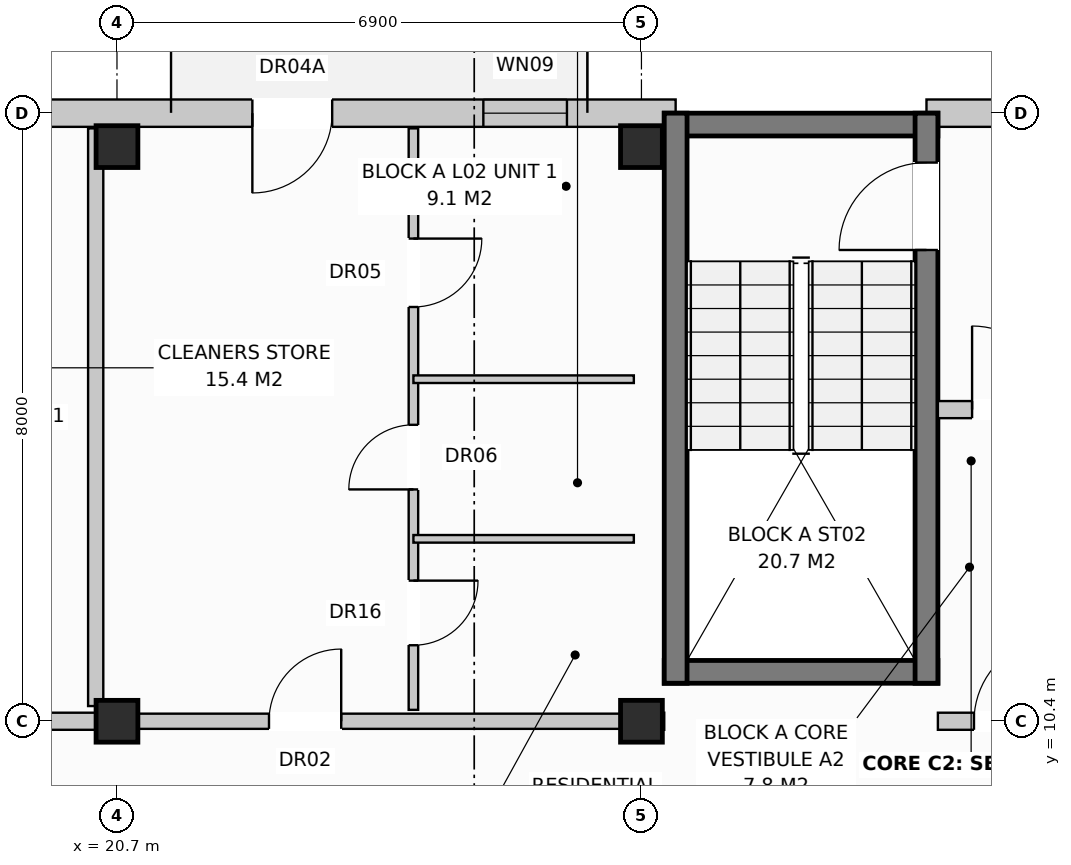
"""IFC4 building model, lengths in metres.
Left out: names, types, materials, properties, quantities, classifications, styles, units other than length and angle.
Written with IfcOpenShell. Run it as: python <this file> out.ifc"""

import sys

from ifc_helpers import new_model, si_unit, direction, frame, frame_2d, origin, origin_with_axes, origin_2d, place, context, subcontext, project, spatial, rectangle, extrude, element, fill, save


model = new_model("IFC4")
c1 = context("Model", 3, precision=1e-05, world=origin(), true_north=direction((0.0, 1.0)))
c2 = subcontext(c1, "Body", "Model", "MODEL_VIEW")
j1 = project(units=[si_unit("LENGTHUNIT", "METRE"), si_unit("PLANEANGLEUNIT", "RADIAN")], contexts=[c1])
p1 = place(None, origin())
s1 = spatial("IfcSite", under=j1, at=p1, CompositionType="ELEMENT")
p2 = place(p1, origin())
s2 = spatial("IfcBuilding", under=s1, at=p2, CompositionType="ELEMENT")
p3 = place(p2, frame((0.0, 0.0, 8.0)))
s3 = spatial("IfcBuildingStorey", under=s2, at=p3, CompositionType="ELEMENT", Elevation=8.0)
for number, where, z_axis, x_axis in (
    (1, (20.7, 10.4, 0.0), (0.0, 0.0, 1.0), (1.0, 0.0, 0.0)),
    (2, (20.7, 17.96, 0.0), (0.0, 0.0, 1.0), (1.0, 0.0, 0.0)),
    (3, (27.6, 10.4, 0.0), (0.0, 0.0, 1.0), (1.0, 0.0, 0.0)),
    (4, (27.6, 17.96, 0.0), (0.0, 0.0, 1.0), (1.0, 0.0, 0.0)),
):
    element("IfcColumn", number, at=place(p3, frame(where, z_axis=z_axis, x_axis=x_axis)), inside=s3, PredefinedType="COLUMN", context=c2, shape_type="SweptSolid", body=[
        extrude(rectangle(XDim=0.55, YDim=0.55, at=origin_2d()), origin(), (0.0, 0.0, 1.0), 3.2),
    ])
p4 = place(p3, frame((10.65, 18.4, 0.0), z_axis=(0.0, 0.0, 1.0), x_axis=(1.0, 0.0, 0.0)))
e5 = element("IfcWall", 5, at=p4, inside=s3, PredefinedType="STANDARD", context=c2, shape_type="SweptSolid", body=[
    extrude(rectangle(XDim=17.4, YDim=0.36, at=frame_2d((8.7, 0.0))), origin(), (0.0, 0.0, 1.0), 2.94),
])
p5 = place(p4, frame((11.831, 0.0, 0.0)))
e6 = element("IfcOpeningElement", 6, at=p5, cuts=e5, PredefinedType="OPENING", context=c2, shape_type="SweptSolid", body=[
    extrude(rectangle(XDim=1.05, YDim=2.12, at=frame_2d((0.525, 1.06))), frame((0.0, 0.192, 0.0), z_axis=(0.0, -1.0, 0.0), x_axis=(1.0, 0.0, 0.0)), (0.0, 0.0, 1.0), 0.384),
])
p6 = place(p4, frame((14.87, 0.0, 0.72)))
e7 = element("IfcOpeningElement", 7, at=p6, cuts=e5, PredefinedType="OPENING", context=c2, shape_type="SweptSolid", body=[
    extrude(rectangle(XDim=1.1, YDim=1.5, at=frame_2d((0.55, 0.75))), frame((0.0, 0.192, 0.0), z_axis=(0.0, -1.0, 0.0), x_axis=(1.0, 0.0, 0.0)), (0.0, 0.0, 1.0), 0.384),
])
p7 = place(p3, frame((31.35, 18.4, 0.0), z_axis=(0.0, 0.0, 1.0), x_axis=(1.0, 0.0, 0.0)))
e8 = element("IfcWall", 8, at=p7, inside=s3, PredefinedType="STANDARD", context=c2, shape_type="SweptSolid", body=[
    extrude(rectangle(XDim=23.68, YDim=0.36, at=frame_2d((11.84, 0.0))), origin(), (0.0, 0.0, 1.0), 2.94),
])
p8 = place(p7, frame((15.27, 0.0, 0.0)))
e9 = element("IfcOpeningElement", 9, at=p8, cuts=e8, PredefinedType="OPENING", context=c2, shape_type="SweptSolid", body=[
    extrude(rectangle(XDim=1.05, YDim=2.12, at=frame_2d((0.525, 1.06))), frame((0.0, 0.192, 0.0), z_axis=(0.0, -1.0, 0.0), x_axis=(1.0, 0.0, 0.0)), (0.0, 0.0, 1.0), 0.384),
])
p9 = place(p7, frame((11.67, 0.0, 0.72)))
e10 = element("IfcOpeningElement", 10, at=p9, cuts=e8, PredefinedType="OPENING", context=c2, shape_type="SweptSolid", body=[
    extrude(rectangle(XDim=1.1, YDim=1.5, at=frame_2d((0.55, 0.75))), frame((0.0, 0.192, 0.0), z_axis=(0.0, -1.0, 0.0), x_axis=(1.0, 0.0, 0.0)), (0.0, 0.0, 1.0), 0.384),
])
p10 = place(p7, frame((17.52, 0.0, 0.9)))
e11 = element("IfcOpeningElement", 11, at=p10, cuts=e8, PredefinedType="OPENING", context=c2, shape_type="SweptSolid", body=[
    extrude(rectangle(XDim=0.95, YDim=1.55, at=frame_2d((0.475, 0.775))), frame((0.0, 0.192, 0.0), z_axis=(0.0, -1.0, 0.0), x_axis=(1.0, 0.0, 0.0)), (0.0, 0.0, 1.0), 0.384),
])
p11 = place(p7, frame((20.67, 0.0, 0.72)))
e12 = element("IfcOpeningElement", 12, at=p11, cuts=e8, PredefinedType="OPENING", context=c2, shape_type="SweptSolid", body=[
    extrude(rectangle(XDim=1.1, YDim=1.5, at=frame_2d((0.55, 0.75))), frame((0.0, 0.192, 0.0), z_axis=(0.0, -1.0, 0.0), x_axis=(1.0, 0.0, 0.0)), (0.0, 0.0, 1.0), 0.384),
])
p12 = place(p3, frame((20.42, 10.6, 0.0), z_axis=(0.0, 0.0, 1.0), x_axis=(0.0, 1.0, 0.0)))
e13 = element("IfcWall", 13, at=p12, inside=s3, PredefinedType="PARTITIONING", context=c2, shape_type="SweptSolid", body=[
    extrude(rectangle(XDim=7.6, YDim=0.2, at=frame_2d((3.8, 0.0))), origin(), (0.0, 0.0, 1.0), 2.94),
])
p13 = place(p3, frame((10.8, 10.4, 0.0), z_axis=(0.0, 0.0, 1.0), x_axis=(1.0, 0.0, 0.0)))
e14 = element("IfcWall", 14, at=p13, inside=s3, PredefinedType="PARTITIONING", context=c2, shape_type="SweptSolid", body=[
    extrude(rectangle(XDim=9.9, YDim=0.225, at=frame_2d((4.95, 0.0))), origin(), (0.0, 0.0, 1.0), 2.38),
])
p14 = place(p13, frame((0.475, 0.0, 0.0)))
e15 = element("IfcOpeningElement", 15, at=p14, cuts=e14, PredefinedType="OPENING", context=c2, shape_type="SweptSolid", body=[
    extrude(rectangle(XDim=1.1, YDim=2.15, at=frame_2d((0.55, 1.075))), frame((0.0, 0.125, 0.0), z_axis=(0.0, -1.0, 0.0), x_axis=(1.0, 0.0, 0.0)), (0.0, 0.0, 1.0), 0.249),
])
p15 = place(p13, frame((5.75, 0.0, 0.0)))
e16 = element("IfcOpeningElement", 16, at=p15, cuts=e14, PredefinedType="OPENING", context=c2, shape_type="SweptSolid", body=[
    extrude(rectangle(XDim=0.9, YDim=2.1, at=frame_2d((0.45, 1.05))), frame((0.0, 0.125, 0.0), z_axis=(0.0, -1.0, 0.0), x_axis=(1.0, 0.0, 0.0)), (0.0, 0.0, 1.0), 0.249),
])
p16 = place(p13, frame((7.8, 0.0, 0.0)))
e17 = element("IfcOpeningElement", 17, at=p16, cuts=e14, PredefinedType="OPENING", context=c2, shape_type="SweptSolid", body=[
    extrude(rectangle(XDim=0.95, YDim=2.15, at=frame_2d((0.475, 1.075))), frame((0.0, 0.125, 0.0), z_axis=(0.0, -1.0, 0.0), x_axis=(1.0, 0.0, 0.0)), (0.0, 0.0, 1.0), 0.249),
])
for number, where, z_axis, x_axis in (
    (18, (27.9, 18.25, 0.0), (0.0, 0.0, 1.0), (1.0, 0.0, 0.0)),
    (19, (27.9, 11.05, 0.0), (0.0, 0.0, 1.0), (1.0, 0.0, 0.0)),
):
    element("IfcWall", number, at=place(p3, frame(where, z_axis=z_axis, x_axis=x_axis)), inside=s3, PredefinedType="SHEAR", context=c2, shape_type="SweptSolid", body=[
        extrude(rectangle(XDim=3.6, YDim=0.3, at=frame_2d((1.8, 0.0))), origin(), (0.0, 0.0, 1.0), 2.94),
    ])
p17 = place(p3, frame((28.05, 10.9, 0.0), z_axis=(0.0, 0.0, 1.0), x_axis=(0.0, 1.0, 0.0)))
e20 = element("IfcWall", 20, at=p17, inside=s3, PredefinedType="SHEAR", context=c2, shape_type="SweptSolid", body=[
    extrude(rectangle(XDim=7.5, YDim=0.3, at=frame_2d((3.75, 0.0))), origin(), (0.0, 0.0, 1.0), 2.94),
])
p18 = place(p3, frame((31.35, 10.9, 0.0), z_axis=(0.0, 0.0, 1.0), x_axis=(0.0, 1.0, 0.0)))
e21 = element("IfcWall", 21, at=p18, inside=s3, PredefinedType="SHEAR", context=c2, shape_type="SweptSolid", body=[
    extrude(rectangle(XDim=7.5, YDim=0.3, at=frame_2d((3.75, 0.0))), origin(), (0.0, 0.0, 1.0), 2.94),
])
p19 = place(p18, frame((5.7, 0.0, 0.0)))
e22 = element("IfcOpeningElement", 22, at=p19, cuts=e21, PredefinedType="OPENING", context=c2, shape_type="SweptSolid", body=[
    extrude(rectangle(XDim=1.15, YDim=2.15, at=frame_2d((0.575, 1.075))), frame((0.0, 0.162, 0.0), z_axis=(0.0, -1.0, 0.0), x_axis=(1.0, 0.0, 0.0)), (0.0, 0.0, 1.0), 0.324),
])
p20 = place(p3, frame((31.5, 14.5, 0.0), z_axis=(0.0, 0.0, 1.0), x_axis=(1.0, 0.0, 0.0)))
e23 = element("IfcWall", 23, at=p20, inside=s3, PredefinedType="PARTITIONING", context=c2, shape_type="SweptSolid", body=[
    extrude(rectangle(XDim=2.2, YDim=0.225, at=frame_2d((1.1, 0.0))), origin(), (0.0, 0.0, 1.0), 2.94),
])
p21 = place(p20, frame((0.45, 0.0, 0.0)))
e24 = element("IfcOpeningElement", 24, at=p21, cuts=e23, PredefinedType="OPENING", context=c2, shape_type="SweptSolid", body=[
    extrude(rectangle(XDim=1.1, YDim=2.15, at=frame_2d((0.55, 1.075))), frame((0.0, 0.125, 0.0), z_axis=(0.0, -1.0, 0.0), x_axis=(1.0, 0.0, 0.0)), (0.0, 0.0, 1.0), 0.249),
])
p22 = place(p3, frame((27.6, 10.4, 0.0), z_axis=(0.0, 0.0, 1.0), x_axis=(1.0, 0.0, 0.0)))
e25 = element("IfcWall", 25, at=p22, inside=s3, PredefinedType="PARTITIONING", context=c2, shape_type="SweptSolid", body=[
    extrude(rectangle(XDim=0.3, YDim=0.225, at=frame_2d((0.15, 0.0))), origin(), (0.0, 0.0, 1.0), 2.94),
])
p23 = place(p3, frame((31.5, 10.4, 0.0), z_axis=(0.0, 0.0, 1.0), x_axis=(1.0, 0.0, 0.0)))
e26 = element("IfcWall", 26, at=p23, inside=s3, PredefinedType="PARTITIONING", context=c2, shape_type="SweptSolid", body=[
    extrude(rectangle(XDim=9.9, YDim=0.225, at=frame_2d((4.95, 0.0))), origin(), (0.0, 0.0, 1.0), 2.38),
])
p24 = place(p23, frame((0.475, 0.0, 0.0)))
e27 = element("IfcOpeningElement", 27, at=p24, cuts=e26, PredefinedType="OPENING", context=c2, shape_type="SweptSolid", body=[
    extrude(rectangle(XDim=1.1, YDim=2.15, at=frame_2d((0.55, 1.075))), frame((0.0, 0.125, 0.0), z_axis=(0.0, -1.0, 0.0), x_axis=(1.0, 0.0, 0.0)), (0.0, 0.0, 1.0), 0.249),
])
p25 = place(p23, frame((5.75, 0.0, 0.0)))
e28 = element("IfcOpeningElement", 28, at=p25, cuts=e26, PredefinedType="OPENING", context=c2, shape_type="SweptSolid", body=[
    extrude(rectangle(XDim=0.9, YDim=2.1, at=frame_2d((0.45, 1.05))), frame((0.0, 0.125, 0.0), z_axis=(0.0, -1.0, 0.0), x_axis=(1.0, 0.0, 0.0)), (0.0, 0.0, 1.0), 0.249),
])
p26 = place(p23, frame((7.8, 0.0, 0.0)))
e29 = element("IfcOpeningElement", 29, at=p26, cuts=e26, PredefinedType="OPENING", context=c2, shape_type="SweptSolid", body=[
    extrude(rectangle(XDim=0.95, YDim=2.15, at=frame_2d((0.475, 1.075))), frame((0.0, 0.125, 0.0), z_axis=(0.0, -1.0, 0.0), x_axis=(1.0, 0.0, 0.0)), (0.0, 0.0, 1.0), 0.249),
])
p27 = place(p3, frame((20.7, 10.4, 0.0), z_axis=(0.0, 0.0, 1.0), x_axis=(1.0, 0.0, 0.0)))
e30 = element("IfcWall", 30, at=p27, inside=s3, PredefinedType="PARTITIONING", context=c2, shape_type="SweptSolid", body=[
    extrude(rectangle(XDim=6.9, YDim=0.2, at=frame_2d((3.45, 0.0))), origin(), (0.0, 0.0, 1.0), 2.38),
])
p28 = place(p27, frame((2.0, 0.0, 0.0)))
e31 = element("IfcOpeningElement", 31, at=p28, cuts=e30, PredefinedType="OPENING", context=c2, shape_type="SweptSolid", body=[
    extrude(rectangle(XDim=0.95, YDim=2.15, at=frame_2d((0.475, 1.075))), frame((0.0, 0.112, 0.0), z_axis=(0.0, -1.0, 0.0), x_axis=(1.0, 0.0, 0.0)), (0.0, 0.0, 1.0), 0.224),
])
p29 = place(p3, frame((24.6, 10.55, 0.0), z_axis=(0.0, 0.0, 1.0), x_axis=(0.0, 1.0, 0.0)))
e32 = element("IfcWall", 32, at=p29, inside=s3, PredefinedType="PARTITIONING", context=c2, shape_type="SweptSolid", body=[
    extrude(rectangle(XDim=7.65, YDim=0.125, at=frame_2d((3.825, 0.0))), origin(), (0.0, 0.0, 1.0), 2.94),
])
p30 = place(p29, frame((0.85, 0.0, 0.0)))
e33 = element("IfcOpeningElement", 33, at=p30, cuts=e32, PredefinedType="OPENING", context=c2, shape_type="SweptSolid", body=[
    extrude(rectangle(XDim=0.85, YDim=2.1, at=frame_2d((0.425, 1.05))), frame((0.0, 0.074, 0.0), z_axis=(0.0, -1.0, 0.0), x_axis=(1.0, 0.0, 0.0)), (0.0, 0.0, 1.0), 0.149),
])
p31 = place(p29, frame((2.9, 0.0, 0.0)))
e34 = element("IfcOpeningElement", 34, at=p31, cuts=e32, PredefinedType="OPENING", context=c2, shape_type="SweptSolid", body=[
    extrude(rectangle(XDim=0.85, YDim=2.05, at=frame_2d((0.425, 1.025))), frame((0.0, 0.074, 0.0), z_axis=(0.0, -1.0, 0.0), x_axis=(1.0, 0.0, 0.0)), (0.0, 0.0, 1.0), 0.149),
])
p32 = place(p29, frame((5.3, 0.0, 0.0)))
e35 = element("IfcOpeningElement", 35, at=p32, cuts=e32, PredefinedType="OPENING", context=c2, shape_type="SweptSolid", body=[
    extrude(rectangle(XDim=0.9, YDim=2.1, at=frame_2d((0.45, 1.05))), frame((0.0, 0.074, 0.0), z_axis=(0.0, -1.0, 0.0), x_axis=(1.0, 0.0, 0.0)), (0.0, 0.0, 1.0), 0.149),
])
for number, where, z_axis, x_axis in (
    (36, (24.6, 12.8, 0.0), (0.0, 0.0, 1.0), (1.0, 0.0, 0.0)),
    (37, (24.6, 14.9, 0.0), (0.0, 0.0, 1.0), (1.0, 0.0, 0.0)),
):
    element("IfcWall", number, at=place(p3, frame(where, z_axis=z_axis, x_axis=x_axis)), inside=s3, PredefinedType="PARTITIONING", context=c2, shape_type="SweptSolid", body=[
        extrude(rectangle(XDim=2.9, YDim=0.1, at=frame_2d((1.45, 0.0))), origin(), (0.0, 0.0, 1.0), 2.94),
    ])
p33 = place(p5, frame((1.05, 0.0, 0.0), z_axis=(0.0, 0.0, 1.0), x_axis=(-1.0, 0.0, 0.0)))
e38 = element("IfcDoor", 38, at=p33, inside=s3, OperationType="SINGLE_SWING_LEFT", PredefinedType="DOOR", context=c2, shape_type="SweptSolid", body=[
    extrude(rectangle(XDim=1.05, YDim=2.12, at=frame_2d((0.525, 1.06))), frame((0.0, 0.025, 0.0), z_axis=(0.0, -1.0, 0.0), x_axis=(1.0, 0.0, 0.0)), (0.0, 0.0, 1.0), 0.05),
])
fill(e6, e38)
p34 = place(p6, origin_with_axes())
e39 = element("IfcWindow", 39, at=p34, inside=s3, PartitioningType="SINGLE_PANEL", PredefinedType="WINDOW", context=c2, shape_type="SweptSolid", body=[
    extrude(rectangle(XDim=1.1, YDim=1.5, at=frame_2d((0.55, 0.75))), frame((0.0, 0.03, 0.0), z_axis=(0.0, -1.0, 0.0), x_axis=(1.0, 0.0, 0.0)), (0.0, 0.0, 1.0), 0.06),
])
fill(e7, e39)
p35 = place(p19, origin_with_axes())
e40 = element("IfcDoor", 40, at=p35, inside=s3, OperationType="SINGLE_SWING_LEFT", PredefinedType="DOOR", context=c2, shape_type="SweptSolid", body=[
    extrude(rectangle(XDim=1.15, YDim=2.15, at=frame_2d((0.575, 1.075))), frame((0.0, 0.025, 0.0), z_axis=(0.0, -1.0, 0.0), x_axis=(1.0, 0.0, 0.0)), (0.0, 0.0, 1.0), 0.05),
])
fill(e22, e40)
p36 = place(p21, origin_with_axes())
e41 = element("IfcDoor", 41, at=p36, inside=s3, OperationType="SINGLE_SWING_LEFT", PredefinedType="DOOR", context=c2, shape_type="SweptSolid", body=[
    extrude(rectangle(XDim=1.1, YDim=2.15, at=frame_2d((0.55, 1.075))), frame((0.0, 0.025, 0.0), z_axis=(0.0, -1.0, 0.0), x_axis=(1.0, 0.0, 0.0)), (0.0, 0.0, 1.0), 0.05),
])
fill(e24, e41)
p37 = place(p24, origin_with_axes())
e42 = element("IfcDoor", 42, at=p37, inside=s3, OperationType="SINGLE_SWING_RIGHT", PredefinedType="DOOR", context=c2, shape_type="SweptSolid", body=[
    extrude(rectangle(XDim=1.1, YDim=2.15, at=frame_2d((0.55, 1.075))), frame((0.0, 0.025, 0.0), z_axis=(0.0, -1.0, 0.0), x_axis=(1.0, 0.0, 0.0)), (0.0, 0.0, 1.0), 0.05),
])
fill(e27, e42)
p38 = place(p28, origin_with_axes())
e43 = element("IfcDoor", 43, at=p38, inside=s3, OperationType="SINGLE_SWING_RIGHT", PredefinedType="DOOR", context=c2, shape_type="SweptSolid", body=[
    extrude(rectangle(XDim=0.95, YDim=2.15, at=frame_2d((0.475, 1.075))), frame((0.0, 0.025, 0.0), z_axis=(0.0, -1.0, 0.0), x_axis=(1.0, 0.0, 0.0)), (0.0, 0.0, 1.0), 0.05),
])
fill(e31, e43)
p39 = place(p30, frame((0.85, 0.0, 0.0), z_axis=(0.0, 0.0, 1.0), x_axis=(-1.0, 0.0, 0.0)))
e44 = element("IfcDoor", 44, at=p39, inside=s3, OperationType="SINGLE_SWING_RIGHT", PredefinedType="DOOR", context=c2, shape_type="SweptSolid", body=[
    extrude(rectangle(XDim=0.85, YDim=2.1, at=frame_2d((0.425, 1.05))), frame((0.0, 0.025, 0.0), z_axis=(0.0, -1.0, 0.0), x_axis=(1.0, 0.0, 0.0)), (0.0, 0.0, 1.0), 0.05),
])
fill(e33, e44)
p40 = place(p31, origin_with_axes())
e45 = element("IfcDoor", 45, at=p40, inside=s3, OperationType="SINGLE_SWING_LEFT", PredefinedType="DOOR", context=c2, shape_type="SweptSolid", body=[
    extrude(rectangle(XDim=0.85, YDim=2.05, at=frame_2d((0.425, 1.025))), frame((0.0, 0.025, 0.0), z_axis=(0.0, -1.0, 0.0), x_axis=(1.0, 0.0, 0.0)), (0.0, 0.0, 1.0), 0.05),
])
fill(e34, e45)
p41 = place(p32, frame((0.9, 0.0, 0.0), z_axis=(0.0, 0.0, 1.0), x_axis=(-1.0, 0.0, 0.0)))
e46 = element("IfcDoor", 46, at=p41, inside=s3, OperationType="SINGLE_SWING_RIGHT", PredefinedType="DOOR", context=c2, shape_type="SweptSolid", body=[
    extrude(rectangle(XDim=0.9, YDim=2.1, at=frame_2d((0.45, 1.05))), frame((0.0, 0.025, 0.0), z_axis=(0.0, -1.0, 0.0), x_axis=(1.0, 0.0, 0.0)), (0.0, 0.0, 1.0), 0.05),
])
fill(e35, e46)
save(model, sys.argv[1])
